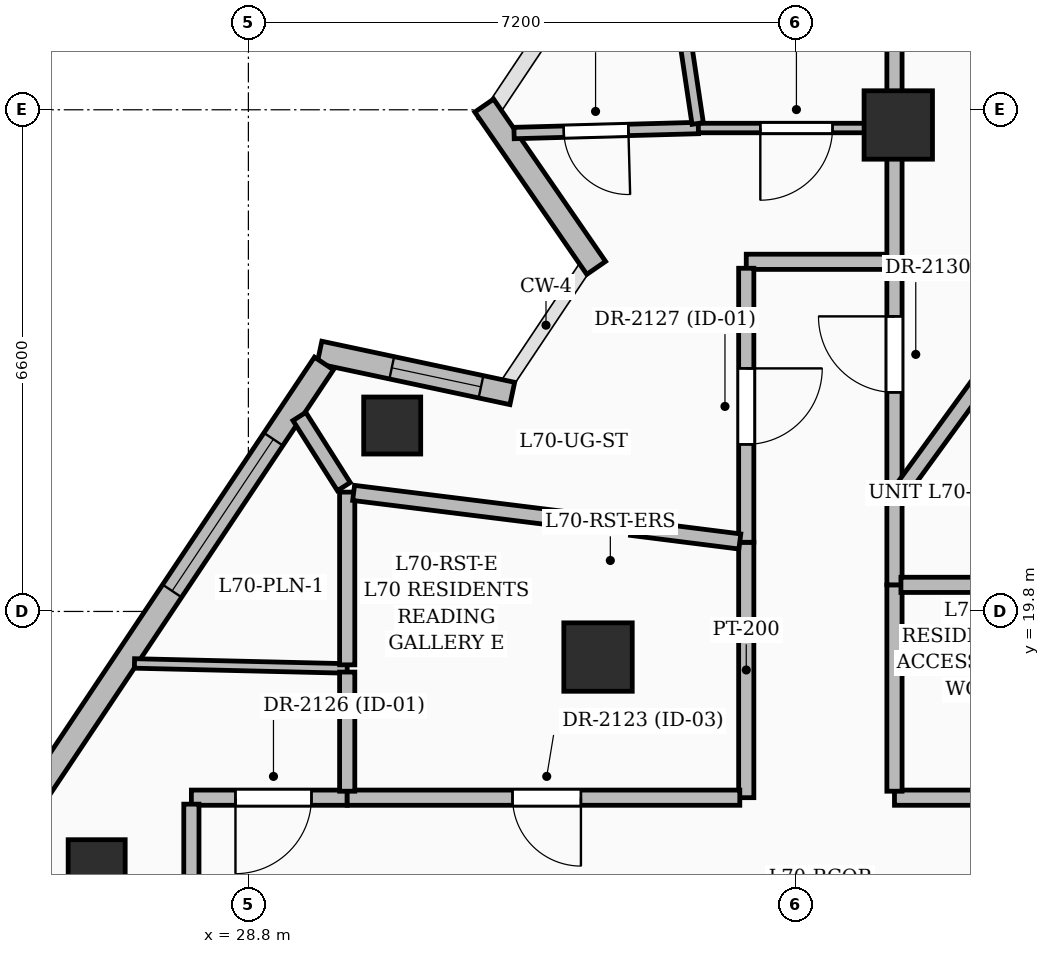
"""IFC4 building model, lengths in metres.
Left out: names, types, materials, properties, quantities, classifications, styles, units other than length and angle.
Written with IfcOpenShell. Run it as: python <this file> out.ifc"""

import sys

from ifc_helpers import new_model, si_unit, direction, frame, frame_2d, origin, origin_2d, place, context, subcontext, project, spatial, rectangle, extrude, element, fill, save


model = new_model("IFC4")
c1 = context("Model", 3, precision=1e-05, world=origin(), true_north=direction((0.0, 1.0)))
c2 = subcontext(c1, "Body", "Model", "MODEL_VIEW")
j1 = project(units=[si_unit("LENGTHUNIT", "METRE"), si_unit("PLANEANGLEUNIT", "RADIAN")], contexts=[c1])
p1 = place(None, origin())
s1 = spatial("IfcSite", under=j1, at=p1, CompositionType="ELEMENT")
p2 = place(p1, origin())
s2 = spatial("IfcBuilding", under=s1, at=p2, CompositionType="ELEMENT")
p3 = place(p2, frame((0.0, 0.0, 270.75)))
s3 = spatial("IfcBuildingStorey", under=s2, at=p3, CompositionType="ELEMENT", Elevation=270.75)
for number, where, z_axis, x_axis in (
    (1, (37.35, 26.2, 0.0), (0.0, 0.0, 1.0), (1.0, 0.0, 0.0)),
    (2, (33.4, 19.2, 0.0), (0.0, 0.0, 1.0), (1.0, 0.0, 0.0)),
):
    element("IfcColumn", number, at=place(p3, frame(where, z_axis=z_axis, x_axis=x_axis)), inside=s3, PredefinedType="COLUMN", context=c2, shape_type="SweptSolid", body=[
        extrude(rectangle(XDim=0.9, YDim=0.9, at=origin_2d()), origin(), (0.0, 0.0, 1.0), 3.75),
    ])
for number, where, z_axis, x_axis in (
    (3, (30.692, 22.246, 0.0), (0.0, 0.0, 1.0), (1.0, 0.0, 0.0)),
    (4, (26.804, 16.422, 0.0), (0.0, 0.0, 1.0), (1.0, 0.0, 0.0)),
):
    element("IfcColumn", number, at=place(p3, frame(where, z_axis=z_axis, x_axis=x_axis)), inside=s3, PredefinedType="COLUMN", context=c2, shape_type="SweptSolid", body=[
        extrude(rectangle(XDim=0.75, YDim=0.75, at=origin_2d()), origin(), (0.0, 0.0, 1.0), 3.75),
    ])
p4 = place(p3, frame((29.735, 23.208, 0.0), z_axis=(0.0, 0.0, 1.0), x_axis=(0.978045557022, -0.208391190766, 0.0)))
e5 = element("IfcWall", 5, at=p4, inside=s3, PredefinedType="SOLIDWALL", context=c2, shape_type="SweptSolid", body=[
    extrude(rectangle(XDim=2.594, YDim=0.3, at=frame_2d((1.297, 0.0))), origin(), (0.0, 0.0, 1.0), 2.696),
])
p5 = place(p4, frame((0.973, 0.0, 0.8)))
e6 = element("IfcOpeningElement", 6, at=p5, cuts=e5, PredefinedType="OPENING", context=c2, shape_type="SweptSolid", body=[
    extrude(rectangle(XDim=1.2, YDim=1.8, at=frame_2d((0.6, 0.9))), frame((0.0, 0.16, 0.0), z_axis=(0.0, -1.0, 0.0), x_axis=(1.0, 0.0, 0.0)), (0.0, 0.0, 1.0), 0.32),
])
p6 = place(p3, frame((33.375, 24.32, 0.0), z_axis=(0.0, 0.0, 1.0), x_axis=(-0.567814329896, 0.823156659916, 0.0)))
e7 = element("IfcWall", 7, at=p6, inside=s3, PredefinedType="SOLIDWALL", context=c2, shape_type="SweptSolid", body=[
    extrude(rectangle(XDim=2.594, YDim=0.3, at=frame_2d((1.297, 0.0))), origin(), (0.0, 0.0, 1.0), 2.696),
])
p7 = place(p3, frame((25.881, 17.2, 0.0), z_axis=(0.0, 0.0, 1.0), x_axis=(0.555219664778, 0.831703747643, 0.0)))
e8 = element("IfcWall", 8, at=p7, inside=s3, PredefinedType="SOLIDWALL", context=c2, shape_type="SweptSolid", body=[
    extrude(rectangle(XDim=7.048, YDim=0.3, at=frame_2d((3.524, 0.0))), origin(), (0.0, 0.0, 1.0), 3.5),
])
p8 = place(p7, frame((3.45, 0.0, 0.6)))
e9 = element("IfcOpeningElement", 9, at=p8, cuts=e8, PredefinedType="OPENING", context=c2, shape_type="SweptSolid", body=[
    extrude(rectangle(XDim=2.4, YDim=2.1, at=frame_2d((1.2, 1.05))), frame((0.0, 0.16, 0.0), z_axis=(0.0, -1.0, 0.0), x_axis=(1.0, 0.0, 0.0)), (0.0, 0.0, 1.0), 0.32),
])
p9 = place(p3, frame((30.1, 17.35, 0.0), z_axis=(0.0, 0.0, 1.0), x_axis=(-1.0, 0.0, 0.0)))
e10 = element("IfcWall", 10, at=p9, inside=s3, PredefinedType="PARTITIONING", context=c2, shape_type="SweptSolid", body=[
    extrude(rectangle(XDim=2.05, YDim=0.2, at=frame_2d((1.025, 0.0))), origin(), (0.0, 0.0, 1.0), 3.5),
])
p10 = place(p9, frame((0.47, 0.0, 0.0)))
e11 = element("IfcOpeningElement", 11, at=p10, cuts=e10, PredefinedType="OPENING", context=c2, shape_type="SweptSolid", body=[
    extrude(rectangle(XDim=1.0, YDim=2.2, at=frame_2d((0.5, 1.1))), frame((0.0, 0.11, 0.0), z_axis=(0.0, -1.0, 0.0), x_axis=(1.0, 0.0, 0.0)), (0.0, 0.0, 1.0), 0.22),
])
p11 = place(p3, frame((28.05, 17.265, 0.0), z_axis=(0.0, 0.0, 1.0), x_axis=(0.0, -1.0, 0.0)))
e12 = element("IfcWall", 12, at=p11, inside=s3, PredefinedType="PARTITIONING", context=c2, shape_type="SweptSolid", body=[
    extrude(rectangle(XDim=2.215, YDim=0.2, at=frame_2d((1.107, 0.0))), origin(), (0.0, 0.0, 1.0), 3.5),
])
p12 = place(p3, frame((35.35, 20.71, 0.0), z_axis=(0.0, 0.0, 1.0), x_axis=(0.0, -1.0, 0.0)))
e13 = element("IfcWall", 13, at=p12, inside=s3, PredefinedType="PARTITIONING", context=c2, shape_type="SweptSolid", body=[
    extrude(rectangle(XDim=3.36, YDim=0.2, at=frame_2d((1.68, 0.0))), origin(), (0.0, 0.0, 1.0), 3.5),
])
p13 = place(p3, frame((35.265, 17.35, 0.0), z_axis=(0.0, 0.0, 1.0), x_axis=(-1.0, 0.0, 0.0)))
e14 = element("IfcWall", 14, at=p13, inside=s3, PredefinedType="PARTITIONING", context=c2, shape_type="SweptSolid", body=[
    extrude(rectangle(XDim=5.165, YDim=0.2, at=frame_2d((2.583, 0.0))), origin(), (0.0, 0.0, 1.0), 2.685),
])
p14 = place(p13, frame((2.09, 0.0, 0.0)))
e15 = element("IfcOpeningElement", 15, at=p14, cuts=e14, PredefinedType="OPENING", context=c2, shape_type="SweptSolid", body=[
    extrude(rectangle(XDim=0.9, YDim=2.1, at=frame_2d((0.45, 1.05))), frame((0.0, 0.11, 0.0), z_axis=(0.0, -1.0, 0.0), x_axis=(1.0, 0.0, 0.0)), (0.0, 0.0, 1.0), 0.22),
])
p15 = place(p3, frame((37.255, 24.4, 0.0), z_axis=(0.0, 0.0, 1.0), x_axis=(-1.0, 0.0, 0.0)))
e16 = element("IfcWall", 16, at=p15, inside=s3, PredefinedType="PARTITIONING", context=c2, shape_type="SweptSolid", body=[
    extrude(rectangle(XDim=1.905, YDim=0.2, at=frame_2d((0.952, 0.0))), origin(), (0.0, 0.0, 1.0), 2.685),
])
p16 = place(p3, frame((35.35, 24.315, 0.0), z_axis=(0.0, 0.0, 1.0), x_axis=(0.0, -1.0, 0.0)))
e17 = element("IfcWall", 17, at=p16, inside=s3, PredefinedType="PARTITIONING", context=c2, shape_type="SweptSolid", body=[
    extrude(rectangle(XDim=3.605, YDim=0.2, at=frame_2d((1.802, 0.0))), origin(), (0.0, 0.0, 1.0), 2.685),
])
p17 = place(p16, frame((1.317, 0.0, 0.0)))
e18 = element("IfcOpeningElement", 18, at=p17, cuts=e17, PredefinedType="OPENING", context=c2, shape_type="SweptSolid", body=[
    extrude(rectangle(XDim=1.0, YDim=2.2, at=frame_2d((0.5, 1.1))), frame((0.0, 0.11, 0.0), z_axis=(0.0, -1.0, 0.0), x_axis=(1.0, 0.0, 0.0)), (0.0, 0.0, 1.0), 0.22),
])
p18 = place(p3, frame((40.18, 17.35, 0.0), z_axis=(0.0, 0.0, 1.0), x_axis=(-1.0, 0.0, 0.0)))
e19 = element("IfcWall", 19, at=p18, inside=s3, PredefinedType="PARTITIONING", context=c2, shape_type="SweptSolid", body=[
    extrude(rectangle(XDim=2.88, YDim=0.2, at=frame_2d((1.44, 0.0))), origin(), (0.0, 0.0, 1.0), 3.5),
])
p19 = place(p18, frame((0.933, 0.0, 0.0)))
e20 = element("IfcOpeningElement", 20, at=p19, cuts=e19, PredefinedType="OPENING", context=c2, shape_type="SweptSolid", body=[
    extrude(rectangle(XDim=0.9, YDim=2.1, at=frame_2d((0.45, 1.05))), frame((0.0, 0.11, 0.0), z_axis=(0.0, -1.0, 0.0), x_axis=(1.0, 0.0, 0.0)), (0.0, 0.0, 1.0), 0.22),
])
p20 = place(p3, frame((37.3, 17.435, 0.0), z_axis=(0.0, 0.0, 1.0), x_axis=(0.0, 1.0, 0.0)))
e21 = element("IfcWall", 21, at=p20, inside=s3, PredefinedType="PARTITIONING", context=c2, shape_type="SweptSolid", body=[
    extrude(rectangle(XDim=2.715, YDim=0.2, at=frame_2d((1.357, 0.0))), origin(), (0.0, 0.0, 1.0), 3.5),
])
p21 = place(p3, frame((37.3, 20.15, 0.0), z_axis=(0.0, 0.0, 1.0), x_axis=(0.0, 1.0, 0.0)))
e22 = element("IfcWall", 22, at=p21, inside=s3, PredefinedType="PARTITIONING", context=c2, shape_type="SweptSolid", body=[
    extrude(rectangle(XDim=1.12, YDim=0.2, at=frame_2d((0.56, 0.0))), origin(), (0.0, 0.0, 1.0), 3.5),
])
p22 = place(p3, frame((37.3, 21.48, 0.0), z_axis=(0.0, 0.0, 1.0), x_axis=(0.0, 1.0, 0.0)))
e23 = element("IfcWall", 23, at=p22, inside=s3, PredefinedType="PARTITIONING", context=c2, shape_type="SweptSolid", body=[
    extrude(rectangle(XDim=2.835, YDim=0.2, at=frame_2d((1.417, 0.0))), origin(), (0.0, 0.0, 1.0), 3.5),
])
p23 = place(p22, frame((1.202, 0.0, 0.0)))
e24 = element("IfcOpeningElement", 24, at=p23, cuts=e23, PredefinedType="OPENING", context=c2, shape_type="SweptSolid", body=[
    extrude(rectangle(XDim=1.0, YDim=2.2, at=frame_2d((0.5, 1.1))), frame((0.0, 0.11, 0.0), z_axis=(0.0, -1.0, 0.0), x_axis=(1.0, 0.0, 0.0)), (0.0, 0.0, 1.0), 0.22),
])
p24 = place(p3, frame((30.1, 19.05, 0.0), z_axis=(0.0, 0.0, 1.0), x_axis=(-0.99972281558, 0.023543406909, 0.0)))
e25 = element("IfcWall", 25, at=p24, inside=s3, PredefinedType="PARTITIONING", context=c2, shape_type="SweptSolid", body=[
    extrude(rectangle(XDim=2.8, YDim=0.125, at=frame_2d((1.4, 0.0))), origin(), (0.0, 0.0, 1.0), 2.691),
])
p25 = place(p3, frame((30.1, 17.435, 0.0), z_axis=(0.0, 0.0, 1.0), x_axis=(0.0, 1.0, 0.0)))
e26 = element("IfcWall", 26, at=p25, inside=s3, PredefinedType="PARTITIONING", context=c2, shape_type="SweptSolid", body=[
    extrude(rectangle(XDim=1.567, YDim=0.2, at=frame_2d((0.784, 0.0))), origin(), (0.0, 0.0, 1.0), 3.5),
])
p26 = place(p3, frame((30.1, 19.097, 0.0), z_axis=(0.0, 0.0, 1.0), x_axis=(0.0, 1.0, 0.0)))
e27 = element("IfcWall", 27, at=p26, inside=s3, PredefinedType="PARTITIONING", context=c2, shape_type="SweptSolid", body=[
    extrude(rectangle(XDim=2.273, YDim=0.2, at=frame_2d((1.136, 0.0))), origin(), (0.0, 0.0, 1.0), 2.691),
])
p27 = place(p3, frame((30.055, 21.442, 0.0), z_axis=(0.0, 0.0, 1.0), x_axis=(-0.535153122092, 0.844755074513, 0.0)))
e28 = element("IfcWall", 28, at=p27, inside=s3, PredefinedType="PARTITIONING", context=c2, shape_type="SweptSolid", body=[
    extrude(rectangle(XDim=1.092, YDim=0.2, at=frame_2d((0.546, 0.0))), origin(), (0.0, 0.0, 1.0), 2.691),
])
p28 = place(p3, frame((33.4, 20.96, 0.0), z_axis=(0.0, 0.0, 1.0), x_axis=(-0.99236456913, 0.123339214916, 0.0)))
e29 = element("IfcWall", 29, at=p28, inside=s3, PredefinedType="PARTITIONING", context=c2, shape_type="SweptSolid", body=[
    extrude(rectangle(XDim=3.24, YDim=0.2, at=frame_2d((1.62, 0.0))), origin(), (0.0, 0.0, 1.0), 2.691),
])
p29 = place(p3, frame((35.266, 20.721, 0.0), z_axis=(0.0, 0.0, 1.0), x_axis=(-0.992191367148, 0.124724861018, 0.0)))
e30 = element("IfcWall", 30, at=p29, inside=s3, PredefinedType="PARTITIONING", context=c2, shape_type="SweptSolid", body=[
    extrude(rectangle(XDim=1.437, YDim=0.2, at=frame_2d((0.718, 0.0))), origin(), (0.0, 0.0, 1.0), 2.685),
])
p30 = place(p3, frame((34.72, 26.16, 0.0), z_axis=(0.0, 0.0, 1.0), x_axis=(-0.999630770767, -0.027172083772, 0.0)))
e31 = element("IfcWall", 31, at=p30, inside=s3, PredefinedType="PARTITIONING", context=c2, shape_type="SweptSolid", body=[
    extrude(rectangle(XDim=2.426, YDim=0.15, at=frame_2d((1.213, 0.0))), origin(), (0.0, 0.0, 1.0), 2.691),
])
p31 = place(p30, frame((0.921, 0.0, 0.0)))
e32 = element("IfcOpeningElement", 32, at=p31, cuts=e31, PredefinedType="OPENING", context=c2, shape_type="SweptSolid", body=[
    extrude(rectangle(XDim=0.85, YDim=2.1, at=frame_2d((0.425, 1.05))), frame((0.0, 0.085, 0.0), z_axis=(0.0, -1.0, 0.0), x_axis=(1.0, 0.0, 0.0)), (0.0, 0.0, 1.0), 0.17),
])
p32 = place(p3, frame((37.3, 26.16, 0.0), z_axis=(0.0, 0.0, 1.0), x_axis=(-1.0, 0.0, 0.0)))
e33 = element("IfcWall", 33, at=p32, inside=s3, PredefinedType="PARTITIONING", context=c2, shape_type="SweptSolid", body=[
    extrude(rectangle(XDim=2.58, YDim=0.125, at=frame_2d((1.29, 0.0))), origin(), (0.0, 0.0, 1.0), 2.862),
])
p33 = place(p32, frame((0.815, 0.0, 0.0)))
e34 = element("IfcOpeningElement", 34, at=p33, cuts=e33, PredefinedType="OPENING", context=c2, shape_type="SweptSolid", body=[
    extrude(rectangle(XDim=0.95, YDim=2.2, at=frame_2d((0.475, 1.1))), frame((0.0, 0.072, 0.0), z_axis=(0.0, -1.0, 0.0), x_axis=(1.0, 0.0, 0.0)), (0.0, 0.0, 1.0), 0.145),
])
p34 = place(p3, frame((37.3, 24.32, 0.0), z_axis=(0.0, 0.0, 1.0), x_axis=(0.0, 1.0, 0.0)))
e35 = element("IfcWall", 35, at=p34, inside=s3, PredefinedType="PARTITIONING", context=c2, shape_type="SweptSolid", body=[
    extrude(rectangle(XDim=1.792, YDim=0.2, at=frame_2d((0.896, 0.0))), origin(), (0.0, 0.0, 1.0), 2.685),
])
p35 = place(p3, frame((34.711, 26.219, 0.0), z_axis=(0.0, 0.0, 1.0), x_axis=(-0.147561165672, 0.989052932044, 0.0)))
e36 = element("IfcWall", 36, at=p35, inside=s3, PredefinedType="PARTITIONING", context=c2, shape_type="SweptSolid", body=[
    extrude(rectangle(XDim=3.478, YDim=0.15, at=frame_2d((1.739, 0.0))), origin(), (0.0, 0.0, 1.0), 2.691),
])
p36 = place(p3, frame((37.3, 26.208, 0.0), z_axis=(0.0, 0.0, 1.0), x_axis=(0.0, 1.0, 0.0)))
e37 = element("IfcWall", 37, at=p36, inside=s3, PredefinedType="PARTITIONING", context=c2, shape_type="SweptSolid", body=[
    extrude(rectangle(XDim=5.812, YDim=0.2, at=frame_2d((2.906, 0.0))), origin(), (0.0, 0.0, 1.0), 2.691),
])
p37 = place(p3, frame((40.18, 20.15, 0.0), z_axis=(0.0, 0.0, 1.0), x_axis=(-1.0, 0.0, 0.0)))
e38 = element("IfcWall", 38, at=p37, inside=s3, PredefinedType="PARTITIONING", context=c2, shape_type="SweptSolid", body=[
    extrude(rectangle(XDim=2.795, YDim=0.2, at=frame_2d((1.397, 0.0))), origin(), (0.0, 0.0, 1.0), 3.5),
])
p38 = place(p3, frame((40.18, 25.23, 0.0), z_axis=(0.0, 0.0, 1.0), x_axis=(-0.588138509847, -0.808760219864, 0.0)))
e39 = element("IfcWall", 39, at=p38, inside=s3, PredefinedType="PARTITIONING", context=c2, shape_type="SweptSolid", body=[
    extrude(rectangle(XDim=4.812, YDim=0.2, at=frame_2d((2.406, 0.0))), origin(), (0.0, 0.0, 1.0), 3.5),
])
p39 = place(p38, frame((1.914, 0.0, 0.0)))
e40 = element("IfcOpeningElement", 40, at=p39, cuts=e39, PredefinedType="OPENING", context=c2, shape_type="SweptSolid", body=[
    extrude(rectangle(XDim=0.95, YDim=2.2, at=frame_2d((0.475, 1.1))), frame((0.0, 0.11, 0.0), z_axis=(0.0, -1.0, 0.0), x_axis=(1.0, 0.0, 0.0)), (0.0, 0.0, 1.0), 0.22),
])
p40 = place(p8, origin())
e41 = element("IfcWindow", 41, at=p40, inside=s3, PartitioningType="SINGLE_PANEL", PredefinedType="WINDOW", context=c2, shape_type="SweptSolid", body=[
    extrude(rectangle(XDim=2.4, YDim=2.1, at=frame_2d((1.2, 1.05))), frame((0.0, 0.03, 0.0), z_axis=(0.0, -1.0, 0.0), x_axis=(1.0, 0.0, 0.0)), (0.0, 0.0, 1.0), 0.06),
])
fill(e9, e41)
p41 = place(p14, origin())
e42 = element("IfcDoor", 42, at=p41, inside=s3, OperationType="SINGLE_SWING_LEFT", PredefinedType="DOOR", context=c2, shape_type="SweptSolid", body=[
    extrude(rectangle(XDim=0.9, YDim=2.1, at=frame_2d((0.45, 1.05))), frame((0.0, 0.025, 0.0), z_axis=(0.0, -1.0, 0.0), x_axis=(1.0, 0.0, 0.0)), (0.0, 0.0, 1.0), 0.05),
])
fill(e15, e42)
p42 = place(p10, origin())
e43 = element("IfcDoor", 43, at=p42, inside=s3, OperationType="SINGLE_SWING_RIGHT", PredefinedType="DOOR", context=c2, shape_type="SweptSolid", body=[
    extrude(rectangle(XDim=1.0, YDim=2.2, at=frame_2d((0.5, 1.1))), frame((0.0, 0.025, 0.0), z_axis=(0.0, -1.0, 0.0), x_axis=(1.0, 0.0, 0.0)), (0.0, 0.0, 1.0), 0.05),
])
fill(e11, e43)
p43 = place(p17, origin())
e44 = element("IfcDoor", 44, at=p43, inside=s3, OperationType="SINGLE_SWING_LEFT", PredefinedType="DOOR", context=c2, shape_type="SweptSolid", body=[
    extrude(rectangle(XDim=1.0, YDim=2.2, at=frame_2d((0.5, 1.1))), frame((0.0, 0.025, 0.0), z_axis=(0.0, -1.0, 0.0), x_axis=(1.0, 0.0, 0.0)), (0.0, 0.0, 1.0), 0.05),
])
fill(e18, e44)
p44 = place(p33, origin())
e45 = element("IfcDoor", 45, at=p44, inside=s3, OperationType="SINGLE_SWING_RIGHT", PredefinedType="DOOR", context=c2, shape_type="SweptSolid", body=[
    extrude(rectangle(XDim=0.95, YDim=2.2, at=frame_2d((0.475, 1.1))), frame((0.0, 0.025, 0.0), z_axis=(0.0, -1.0, 0.0), x_axis=(1.0, 0.0, 0.0)), (0.0, 0.0, 1.0), 0.05),
])
fill(e34, e45)
p45 = place(p31, origin())
e46 = element("IfcDoor", 46, at=p45, inside=s3, OperationType="SINGLE_SWING_LEFT", PredefinedType="DOOR", context=c2, shape_type="SweptSolid", body=[
    extrude(rectangle(XDim=0.85, YDim=2.1, at=frame_2d((0.425, 1.05))), frame((0.0, 0.025, 0.0), z_axis=(0.0, -1.0, 0.0), x_axis=(1.0, 0.0, 0.0)), (0.0, 0.0, 1.0), 0.05),
])
fill(e32, e46)
p46 = place(p23, origin())
e47 = element("IfcDoor", 47, at=p46, inside=s3, OperationType="SINGLE_SWING_RIGHT", PredefinedType="DOOR", context=c2, shape_type="SweptSolid", body=[
    extrude(rectangle(XDim=1.0, YDim=2.2, at=frame_2d((0.5, 1.1))), frame((0.0, 0.025, 0.0), z_axis=(0.0, -1.0, 0.0), x_axis=(1.0, 0.0, 0.0)), (0.0, 0.0, 1.0), 0.05),
])
fill(e24, e47)
p47 = place(p5, origin())
e48 = element("IfcWindow", 48, at=p47, inside=s3, PartitioningType="SINGLE_PANEL", PredefinedType="WINDOW", context=c2, shape_type="SweptSolid", body=[
    extrude(rectangle(XDim=1.2, YDim=1.8, at=frame_2d((0.6, 0.9))), frame((0.0, 0.03, 0.0), z_axis=(0.0, -1.0, 0.0), x_axis=(1.0, 0.0, 0.0)), (0.0, 0.0, 1.0), 0.06),
])
fill(e6, e48)
save(model, sys.argv[1])
